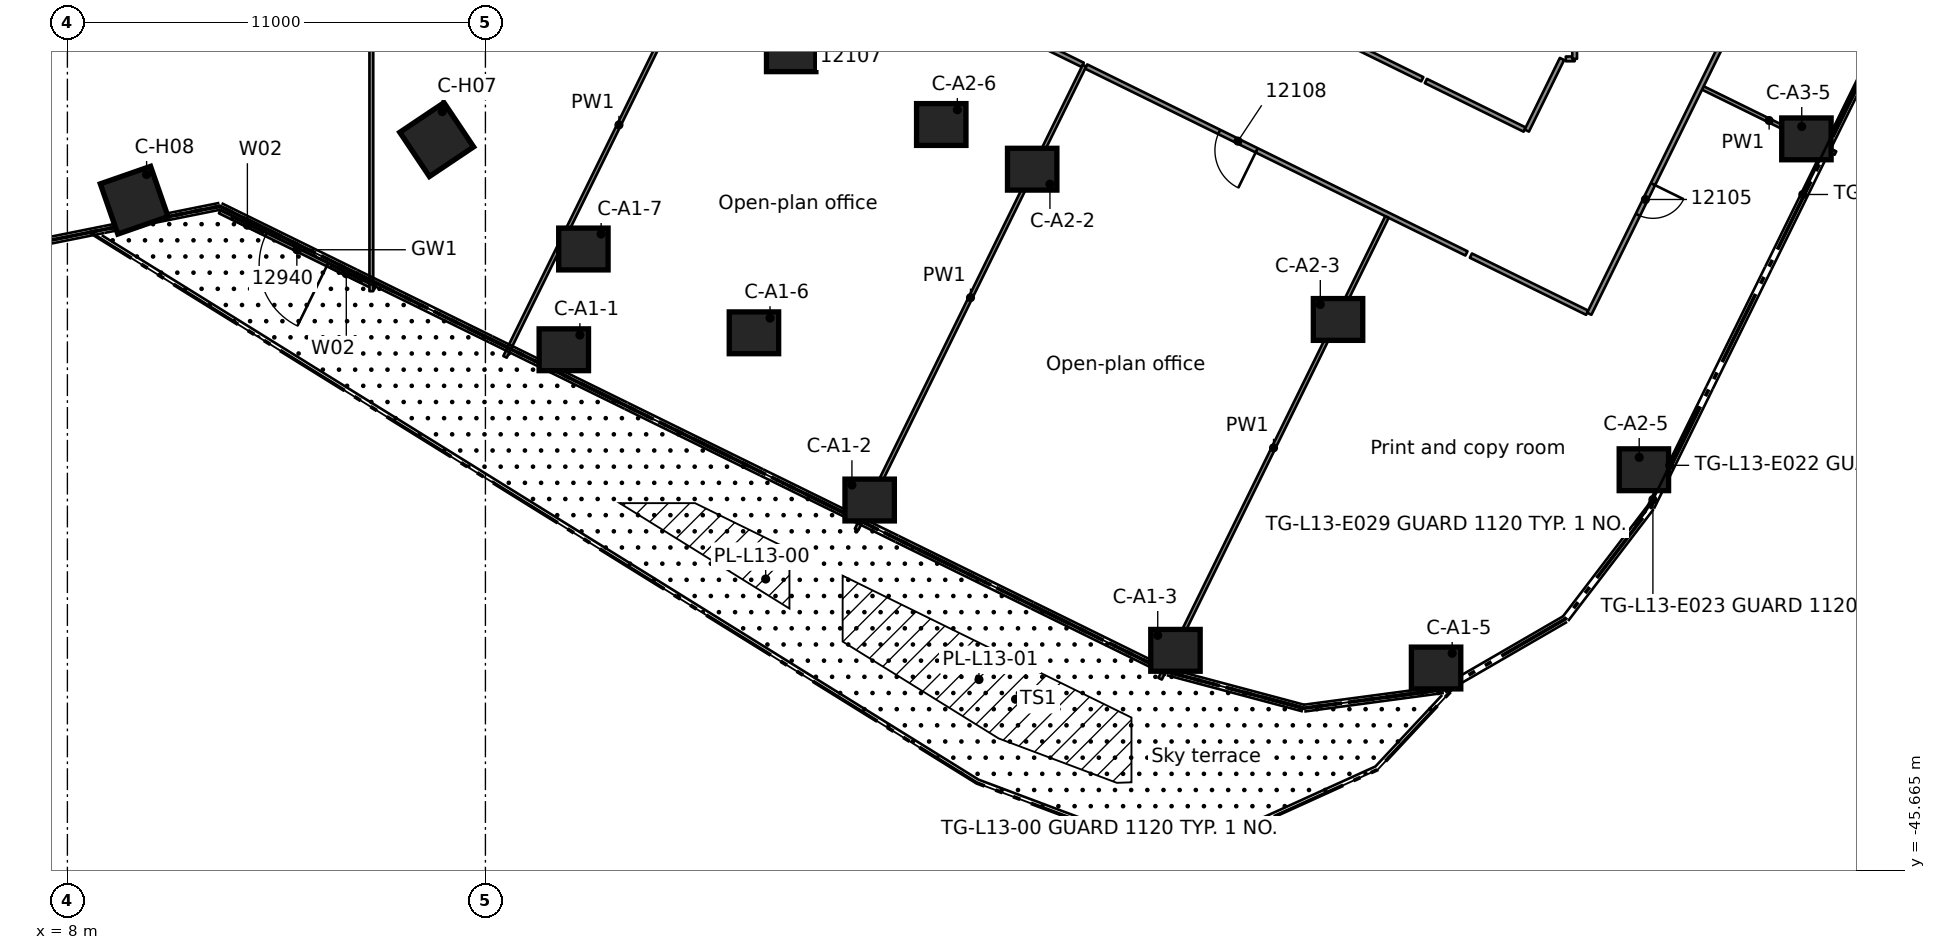
"""IFC4 building model, lengths in metres.
Left out: names, types, materials, properties, quantities, classifications, styles, units other than length and angle.
Written with IfcOpenShell. Run it as: python <this file> out.ifc"""

import sys

from ifc_helpers import new_model, si_unit, direction, frame, frame_2d, origin, origin_2d, place, context, subcontext, project, spatial, rectangle, extrude, element, fill, save


model = new_model("IFC4")
c1 = context("Model", 3, precision=1e-05, world=origin(), true_north=direction((0.0, 1.0)))
c2 = subcontext(c1, "Body", "Model", "MODEL_VIEW")
j1 = project(units=[si_unit("LENGTHUNIT", "METRE"), si_unit("PLANEANGLEUNIT", "RADIAN")], contexts=[c1])
p1 = place(None, origin())
s1 = spatial("IfcSite", under=j1, at=p1, CompositionType="ELEMENT")
p2 = place(p1, origin())
s2 = spatial("IfcBuilding", under=s1, at=p2, CompositionType="ELEMENT")
p3 = place(p2, frame((0.0, 0.0, 58.8)))
s3 = spatial("IfcBuildingStorey", under=s2, at=p3, CompositionType="ELEMENT", Elevation=58.8)
for number, where, z_axis, x_axis in (
    (1, (21.063, -31.964, 0.0), (0.0, 0.0, 1.0), (1.0, 0.0, 0.0)),
    (2, (29.111, -35.918, 0.0), (0.0, 0.0, 1.0), (1.0, 0.0, 0.0)),
    (3, (37.158, -39.873, 0.0), (0.0, 0.0, 1.0), (1.0, 0.0, 0.0)),
    (4, (44.016, -40.338, 0.0), (0.0, 0.0, 1.0), (1.0, 0.0, 0.0)),
    (5, (26.066, -31.518, 0.0), (0.0, 0.0, 1.0), (1.0, 0.0, 0.0)),
    (6, (21.578, -29.313, 0.0), (0.0, 0.0, 1.0), (1.0, 0.0, 0.0)),
    (7, (33.388, -27.213, 0.0), (0.0, 0.0, 1.0), (1.0, 0.0, 0.0)),
    (8, (41.436, -31.167, 0.0), (0.0, 0.0, 1.0), (1.0, 0.0, 0.0)),
    (9, (49.484, -35.121, 0.0), (0.0, 0.0, 1.0), (1.0, 0.0, 0.0)),
    (10, (30.995, -26.037, 0.0), (0.0, 0.0, 1.0), (1.0, 0.0, 0.0)),
    (11, (27.046, -24.096, 0.0), (0.0, 0.0, 1.0), (1.0, 0.0, 0.0)),
    (12, (53.761, -26.415, 0.0), (0.0, 0.0, 1.0), (1.0, 0.0, 0.0)),
):
    element("IfcColumn", number, at=place(p3, frame(where, z_axis=z_axis, x_axis=x_axis)), inside=s3, PredefinedType="COLUMN", context=c2, shape_type="SweptSolid", body=[
        extrude(rectangle(XDim=1.3, YDim=1.1, at=origin_2d()), origin(), (0.0, 0.0, 1.0), 3.5),
    ])
for number, where, z_axis, x_axis in (
    (13, (17.718, -26.434, 0.0), (0.0, 0.0, 1.0), (0.557, -0.831, 0.0)),
    (14, (9.758, -28.029, 0.0), (0.0, 0.0, 1.0), (0.329, -0.944, 0.0)),
):
    element("IfcColumn", number, at=place(p3, frame(where, z_axis=z_axis, x_axis=x_axis)), inside=s3, PredefinedType="COLUMN", context=c2, shape_type="SweptSolid", body=[
        extrude(rectangle(XDim=1.4, YDim=1.4, at=origin_2d()), origin(), (0.0, 0.0, 1.0), 3.5),
    ])
p4 = place(p3, frame((16.094, -30.336, 0.0), z_axis=(0.0, 0.0, 1.0), x_axis=(-0.897538680415, 0.440935729056, 0.0)))
e15 = element("IfcWall", 15, at=p4, inside=s3, PredefinedType="STANDARD", context=c2, shape_type="SweptSolid", body=[
    extrude(rectangle(XDim=4.55, YDim=0.1, at=frame_2d((2.275, 0.0))), origin(), (0.0, 0.0, 1.0), 3.1),
])
p5 = place(p4, frame((1.39, 0.0, 0.0)))
e16 = element("IfcOpeningElement", 16, at=p5, cuts=e15, PredefinedType="OPENING", context=c2, shape_type="SweptSolid", body=[
    extrude(rectangle(XDim=1.8, YDim=2.4, at=frame_2d((0.9, 1.2))), frame((0.0, 0.06, 0.0), z_axis=(0.0, -1.0, 0.0), x_axis=(1.0, 0.0, 0.0)), (0.0, 0.0, 1.0), 0.12),
])
p6 = place(p4, frame((0.39, 0.0, 0.0)))
e17 = element("IfcOpeningElement", 17, at=p6, cuts=e15, PredefinedType="OPENING", context=c2, shape_type="SweptSolid", body=[
    extrude(rectangle(XDim=0.9, YDim=2.4, at=frame_2d((0.45, 1.2))), frame((0.0, 0.06, 0.0), z_axis=(0.0, -1.0, 0.0), x_axis=(1.0, 0.0, 0.0)), (0.0, 0.0, 1.0), 0.12),
])
p7 = place(p4, frame((3.291, 0.0, 0.0)))
e18 = element("IfcOpeningElement", 18, at=p7, cuts=e15, PredefinedType="OPENING", context=c2, shape_type="SweptSolid", body=[
    extrude(rectangle(XDim=0.9, YDim=2.4, at=frame_2d((0.45, 1.2))), frame((0.0, 0.06, 0.0), z_axis=(0.0, -1.0, 0.0), x_axis=(1.0, 0.0, 0.0)), (0.0, 0.0, 1.0), 0.12),
])
p8 = place(p3, frame((44.815, -29.429, 0.0), z_axis=(0.0, 0.0, 1.0), x_axis=(-0.8975062817, 0.441001671549, 0.0)))
e19 = element("IfcWall", 19, at=p8, inside=s3, PredefinedType="PARTITIONING", context=c2, shape_type="SweptSolid", body=[
    extrude(rectangle(XDim=11.15, YDim=0.125, at=frame_2d((5.575, 0.0))), origin(), (0.0, 0.0, 1.0), 3.08),
])
p9 = place(p8, frame((6.149, 0.0, 0.0)))
e20 = element("IfcOpeningElement", 20, at=p9, cuts=e19, PredefinedType="OPENING", context=c2, shape_type="SweptSolid", body=[
    extrude(rectangle(XDim=1.1, YDim=2.1, at=frame_2d((0.55, 1.05))), frame((0.0, 0.073, 0.0), z_axis=(0.0, -1.0, 0.0), x_axis=(1.0, 0.0, 0.0)), (0.0, 0.0, 1.0), 0.145),
])
p10 = place(p3, frame((44.932, -29.487, 0.0), z_axis=(0.0, 0.0, 1.0), x_axis=(0.897586164131, -0.440839061291, 0.0)))
e21 = element("IfcWall", 21, at=p10, inside=s3, PredefinedType="PARTITIONING", context=c2, shape_type="SweptSolid", body=[
    extrude(rectangle(XDim=3.407, YDim=0.125, at=frame_2d((1.704, 0.0))), origin(), (0.0, 0.0, 1.0), 3.08),
])
p11 = place(p3, frame((36.396, -21.28, 0.0), z_axis=(0.0, 0.0, 1.0), x_axis=(0.897479279636, -0.441056620656, 0.0)))
e22 = element("IfcWall", 22, at=p11, inside=s3, PredefinedType="PARTITIONING", context=c2, shape_type="SweptSolid", body=[
    extrude(rectangle(XDim=8.087, YDim=0.125, at=frame_2d((4.043, 0.0))), origin(), (0.0, 0.0, 1.0), 3.08),
])
p12 = place(p11, frame((3.55, 0.0, 0.0)))
e23 = element("IfcOpeningElement", 23, at=p12, cuts=e22, PredefinedType="OPENING", context=c2, shape_type="SweptSolid", body=[
    extrude(rectangle(XDim=0.9, YDim=2.1, at=frame_2d((0.45, 1.05))), frame((0.0, 0.073, 0.0), z_axis=(0.0, -1.0, 0.0), x_axis=(1.0, 0.0, 0.0)), (0.0, 0.0, 1.0), 0.145),
])
p13 = place(p3, frame((43.747, -24.892, 0.0), z_axis=(0.0, 0.0, 1.0), x_axis=(0.897391556566, -0.441235078165, 0.0)))
e24 = element("IfcWall", 24, at=p13, inside=s3, PredefinedType="PARTITIONING", context=c2, shape_type="SweptSolid", body=[
    extrude(rectangle(XDim=2.896, YDim=0.125, at=frame_2d((1.448, 0.0))), origin(), (0.0, 0.0, 1.0), 3.08),
])
p14 = place(p3, frame((51.036, -25.076, 0.0), z_axis=(0.0, 0.0, 1.0), x_axis=(0.897583548385, -0.440844387136, 0.0)))
e25 = element("IfcWall", 25, at=p14, inside=s3, PredefinedType="PARTITIONING", context=c2, shape_type="SweptSolid", body=[
    extrude(rectangle(XDim=3.886, YDim=0.1, at=frame_2d((1.943, 0.0))), origin(), (0.0, 0.0, 1.0), 3.08),
])
p15 = place(p3, frame((33.681, -23.959, 0.0), z_axis=(0.0, 0.0, 1.0), x_axis=(0.897699526178, -0.440608171394, 0.0)))
e26 = element("IfcWall", 26, at=p15, inside=s3, PredefinedType="PARTITIONING", context=c2, shape_type="SweptSolid", body=[
    extrude(rectangle(XDim=1.155, YDim=0.125, at=frame_2d((0.578, 0.0))), origin(), (0.0, 0.0, 1.0), 3.08),
])
p16 = place(p3, frame((47.43, -24.31, 0.0), z_axis=(0.0, 0.0, 1.0), x_axis=(1.0, 0.0, 0.0)))
e27 = element("IfcWall", 27, at=p16, inside=s3, PredefinedType="PARTITIONING", context=c2, shape_type="SweptSolid", body=[
    extrude(rectangle(XDim=0.232, YDim=0.125, at=frame_2d((0.116, 0.0))), origin(), (0.0, 0.0, 1.0), 3.08),
])
p17 = place(p3, frame((53.911, -19.084, 0.0), z_axis=(0.0, 0.0, 1.0), x_axis=(-0.441018582797, -0.897497971935, 0.0)))
e28 = element("IfcWall", 28, at=p17, inside=s3, PredefinedType="PARTITIONING", context=c2, shape_type="SweptSolid", body=[
    extrude(rectangle(XDim=13.296, YDim=0.125, at=frame_2d((6.648, 0.0))), origin(), (0.0, 0.0, 1.0), 3.08),
])
p18 = place(p17, frame((9.495, 0.0, 0.0)))
e29 = element("IfcOpeningElement", 29, at=p18, cuts=e28, PredefinedType="OPENING", context=c2, shape_type="SweptSolid", body=[
    extrude(rectangle(XDim=0.9, YDim=2.1, at=frame_2d((0.45, 1.05))), frame((0.0, 0.073, 0.0), z_axis=(0.0, -1.0, 0.0), x_axis=(1.0, 0.0, 0.0)), (0.0, 0.0, 1.0), 0.145),
])
p19 = place(p17, frame((2.846, 0.0, 0.0)))
e30 = element("IfcOpeningElement", 30, at=p19, cuts=e28, PredefinedType="OPENING", context=c2, shape_type="SweptSolid", body=[
    extrude(rectangle(XDim=0.9, YDim=2.1, at=frame_2d((0.45, 1.05))), frame((0.0, 0.073, 0.0), z_axis=(0.0, -1.0, 0.0), x_axis=(1.0, 0.0, 0.0)), (0.0, 0.0, 1.0), 0.145),
])
p20 = place(p3, frame((46.403, -26.197, 0.0), z_axis=(0.0, 0.0, 1.0), x_axis=(0.440925238095, 0.897543834256, 0.0)))
e31 = element("IfcWall", 31, at=p20, inside=s3, PredefinedType="PARTITIONING", context=c2, shape_type="SweptSolid", body=[
    extrude(rectangle(XDim=2.1, YDim=0.125, at=frame_2d((1.05, 0.0))), origin(), (0.0, 0.0, 1.0), 3.08),
])
p21 = place(p3, frame((36.754, -40.62, 0.0), z_axis=(0.0, 0.0, 1.0), x_axis=(0.440962253121, 0.897525649395, 0.0)))
e32 = element("IfcWall", 32, at=p21, inside=s3, PredefinedType="PARTITIONING", context=c2, shape_type="SweptSolid", body=[
    extrude(rectangle(XDim=13.536, YDim=0.1, at=frame_2d((6.768, 0.0))), origin(), (0.0, 0.0, 1.0), 3.08),
])
p22 = place(p3, frame((28.766, -36.695, 0.0), z_axis=(0.0, 0.0, 1.0), x_axis=(0.440983805809, 0.897515060049, 0.0)))
e33 = element("IfcWall", 33, at=p22, inside=s3, PredefinedType="PARTITIONING", context=c2, shape_type="SweptSolid", body=[
    extrude(rectangle(XDim=13.599, YDim=0.1, at=frame_2d((6.799, 0.0))), origin(), (0.0, 0.0, 1.0), 3.08),
])
p23 = place(p3, frame((19.516, -32.151, 0.0), z_axis=(0.0, 0.0, 1.0), x_axis=(0.440904640859, 0.897553952512, 0.0)))
e34 = element("IfcWall", 34, at=p23, inside=s3, PredefinedType="PARTITIONING", context=c2, shape_type="SweptSolid", body=[
    extrude(rectangle(XDim=13.599, YDim=0.1, at=frame_2d((6.799, 0.0))), origin(), (0.0, 0.0, 1.0), 3.08),
])
p24 = place(p3, frame((47.662, -24.31, 0.0), z_axis=(0.0, 0.0, 1.0), x_axis=(0.0, 1.0, 0.0)))
e35 = element("IfcWall", 35, at=p24, inside=s3, PredefinedType="PARTITIONING", context=c2, shape_type="SweptSolid", body=[
    extrude(rectangle(XDim=0.676, YDim=0.125, at=frame_2d((0.338, 0.0))), origin(), (0.0, 0.0, 1.0), 3.08),
])
p25 = place(p3, frame((15.998, -30.423, 0.0), z_axis=(0.0, 0.0, 1.0), x_axis=(0.0, 1.0, 0.0)))
e36 = element("IfcWall", 36, at=p25, inside=s3, PredefinedType="PARTITIONING", context=c2, shape_type="SweptSolid", body=[
    extrude(rectangle(XDim=15.309, YDim=0.1, at=frame_2d((7.655, 0.0))), origin(), (0.0, 0.0, 1.0), 3.08),
])
p26 = place(p5, origin())
e37 = element("IfcDoor", 37, at=p26, inside=s3, OperationType="DOUBLE_DOOR_SINGLE_SWING", PredefinedType="DOOR", context=c2, shape_type="SweptSolid", body=[
    extrude(rectangle(XDim=1.8, YDim=2.4, at=frame_2d((0.9, 1.2))), frame((0.0, 0.025, 0.0), z_axis=(0.0, -1.0, 0.0), x_axis=(1.0, 0.0, 0.0)), (0.0, 0.0, 1.0), 0.05),
])
fill(e16, e37)
p27 = place(p6, origin())
e38 = element("IfcWindow", 38, at=p27, inside=s3, PartitioningType="SINGLE_PANEL", PredefinedType="WINDOW", context=c2, shape_type="SweptSolid", body=[
    extrude(rectangle(XDim=0.9, YDim=2.4, at=frame_2d((0.45, 1.2))), frame((0.0, 0.03, 0.0), z_axis=(0.0, -1.0, 0.0), x_axis=(1.0, 0.0, 0.0)), (0.0, 0.0, 1.0), 0.06),
])
fill(e17, e38)
p28 = place(p7, origin())
e39 = element("IfcWindow", 39, at=p28, inside=s3, PartitioningType="SINGLE_PANEL", PredefinedType="WINDOW", context=c2, shape_type="SweptSolid", body=[
    extrude(rectangle(XDim=0.9, YDim=2.4, at=frame_2d((0.45, 1.2))), frame((0.0, 0.03, 0.0), z_axis=(0.0, -1.0, 0.0), x_axis=(1.0, 0.0, 0.0)), (0.0, 0.0, 1.0), 0.06),
])
fill(e18, e39)
p29 = place(p18, origin())
e40 = element("IfcDoor", 40, at=p29, inside=s3, OperationType="SINGLE_SWING_RIGHT", PredefinedType="DOOR", context=c2, shape_type="SweptSolid", body=[
    extrude(rectangle(XDim=0.9, YDim=2.1, at=frame_2d((0.45, 1.05))), frame((0.0, 0.025, 0.0), z_axis=(0.0, -1.0, 0.0), x_axis=(1.0, 0.0, 0.0)), (0.0, 0.0, 1.0), 0.05),
])
fill(e29, e40)
p30 = place(p9, origin())
e41 = element("IfcDoor", 41, at=p30, inside=s3, OperationType="SINGLE_SWING_RIGHT", PredefinedType="DOOR", context=c2, shape_type="SweptSolid", body=[
    extrude(rectangle(XDim=1.1, YDim=2.1, at=frame_2d((0.55, 1.05))), frame((0.0, 0.025, 0.0), z_axis=(0.0, -1.0, 0.0), x_axis=(1.0, 0.0, 0.0)), (0.0, 0.0, 1.0), 0.05),
])
fill(e20, e41)
save(model, sys.argv[1])
